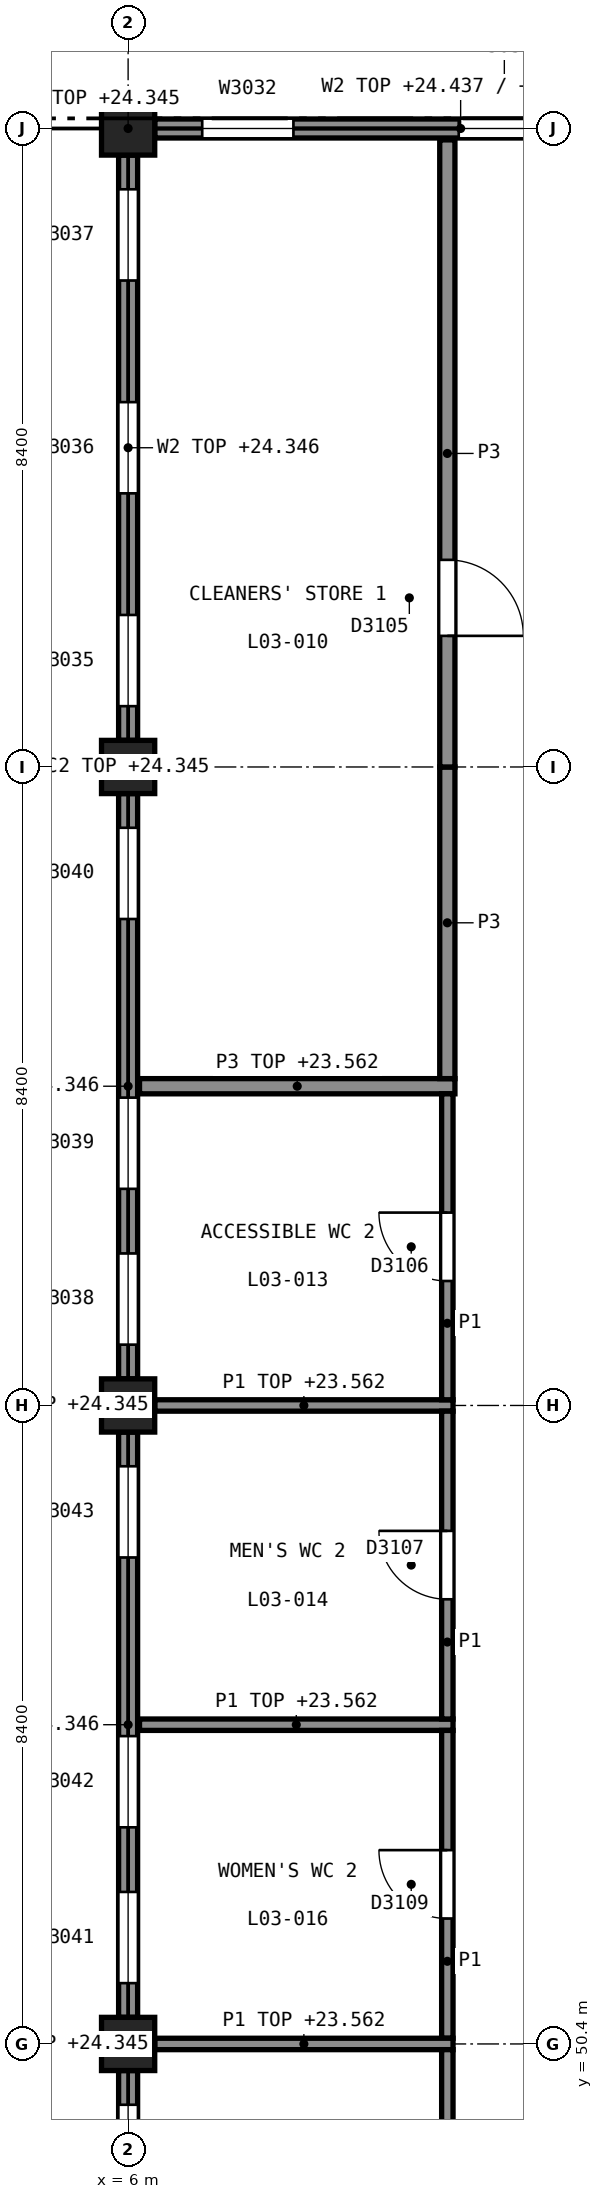
"""IFC4 building model, lengths in metres.
Left out: names, types, materials, properties, quantities, classifications, styles, units other than length and angle.
Written with IfcOpenShell. Run it as: python <this file> out.ifc"""

import sys

from ifc_helpers import new_model, si_unit, direction, frame, frame_2d, origin, origin_2d, place, context, subcontext, project, spatial, polyline, rectangle, outline, extrude, element, fill, save


model = new_model("IFC4")
c1 = context("Model", 3, precision=1e-05, world=origin(), true_north=direction((0.0, 1.0)))
c2 = subcontext(c1, "Body", "Model", "MODEL_VIEW")
j1 = project(units=[si_unit("LENGTHUNIT", "METRE"), si_unit("PLANEANGLEUNIT", "RADIAN")], contexts=[c1])
p1 = place(None, origin())
s1 = spatial("IfcSite", under=j1, at=p1, CompositionType="ELEMENT")
p2 = place(p1, origin())
s2 = spatial("IfcBuilding", under=s1, at=p2, CompositionType="ELEMENT")
p3 = place(p2, frame((0.0, 0.0, 20.0)))
s3 = spatial("IfcBuildingStorey", under=s2, at=p3, CompositionType="ELEMENT", Elevation=20.0)
for number, where, z_axis, x_axis in (
    (1, (6.0, 50.4, 0.0), (0.0, 0.0, 1.0), (1.0, 0.0, 0.0)),
    (2, (6.0, 58.8, 0.0), (0.0, 0.0, 1.0), (1.0, 0.0, 0.0)),
    (3, (6.0, 67.2, 0.0), (0.0, 0.0, 1.0), (1.0, 0.0, 0.0)),
    (4, (6.0, 75.6, 0.0), (0.0, 0.0, 1.0), (1.0, 0.0, 0.0)),
):
    element("IfcColumn", number, at=place(p3, frame(where, z_axis=z_axis, x_axis=x_axis)), inside=s3, PredefinedType="COLUMN", context=c2, shape_type="SweptSolid", body=[
        extrude(rectangle(XDim=0.7, YDim=0.7, at=origin_2d()), origin(), (0.0, 0.0, 1.0), 4.345),
    ])
p4 = place(p3, frame((6.35, 75.6, 0.0), z_axis=(0.0, 0.0, 1.0), x_axis=(1.0, 0.0, 0.0)))
e5 = element("IfcWall", 5, at=p4, inside=s3, PredefinedType="SOLIDWALL", context=c2, shape_type="SweptSolid", body=[
    extrude(outline(polyline([(0.0, 0.0), (8.05, 0.0), (8.05, 6.546), (0.0, 4.437), (0.0, 0.0)])), frame((0.0, 0.125, 0.0), z_axis=(0.0, -1.0, 0.0), x_axis=(1.0, 0.0, 0.0)), (0.0, 0.0, 1.0), 0.25),
])
p5 = place(p4, frame((0.625, 0.0, 0.9)))
e6 = element("IfcOpeningElement", 6, at=p5, cuts=e5, PredefinedType="OPENING", context=c2, shape_type="SweptSolid", body=[
    extrude(rectangle(XDim=1.2, YDim=2.1, at=frame_2d((0.6, 1.05))), frame((0.0, 0.135, 0.0), z_axis=(0.0, -1.0, 0.0), x_axis=(1.0, 0.0, 0.0)), (0.0, 0.0, 1.0), 0.27),
])
p6 = place(p4, frame((4.0, 0.0, 0.9)))
e7 = element("IfcOpeningElement", 7, at=p6, cuts=e5, PredefinedType="OPENING", context=c2, shape_type="SweptSolid", body=[
    extrude(rectangle(XDim=1.2, YDim=2.1, at=frame_2d((0.6, 1.05))), frame((0.0, 0.135, 0.0), z_axis=(0.0, -1.0, 0.0), x_axis=(1.0, 0.0, 0.0)), (0.0, 0.0, 1.0), 0.27),
])
p7 = place(p4, frame((6.225, 0.0, 0.9)))
e8 = element("IfcOpeningElement", 8, at=p7, cuts=e5, PredefinedType="OPENING", context=c2, shape_type="SweptSolid", body=[
    extrude(rectangle(XDim=1.2, YDim=2.1, at=frame_2d((0.6, 1.05))), frame((0.0, 0.135, 0.0), z_axis=(0.0, -1.0, 0.0), x_axis=(1.0, 0.0, 0.0)), (0.0, 0.0, 1.0), 0.27),
])
p8 = place(p3, frame((6.0, 67.55, 0.0), z_axis=(0.0, 0.0, 1.0), x_axis=(0.0, 1.0, 0.0)))
e9 = element("IfcWall", 9, at=p8, inside=s3, PredefinedType="SOLIDWALL", context=c2, shape_type="SweptSolid", body=[
    extrude(rectangle(XDim=7.7, YDim=0.25, at=frame_2d((3.85, 0.0))), origin(), (0.0, 0.0, 1.0), 4.346),
])
p9 = place(p8, frame((0.45, 0.0, 0.9)))
e10 = element("IfcOpeningElement", 10, at=p9, cuts=e9, PredefinedType="OPENING", context=c2, shape_type="SweptSolid", body=[
    extrude(rectangle(XDim=1.2, YDim=2.1, at=frame_2d((0.6, 1.05))), frame((0.0, 0.135, 0.0), z_axis=(0.0, -1.0, 0.0), x_axis=(1.0, 0.0, 0.0)), (0.0, 0.0, 1.0), 0.27),
])
p10 = place(p8, frame((3.25, 0.0, 0.9)))
e11 = element("IfcOpeningElement", 11, at=p10, cuts=e9, PredefinedType="OPENING", context=c2, shape_type="SweptSolid", body=[
    extrude(rectangle(XDim=1.2, YDim=2.1, at=frame_2d((0.6, 1.05))), frame((0.0, 0.135, 0.0), z_axis=(0.0, -1.0, 0.0), x_axis=(1.0, 0.0, 0.0)), (0.0, 0.0, 1.0), 0.27),
])
p11 = place(p8, frame((6.05, 0.0, 0.9)))
e12 = element("IfcOpeningElement", 12, at=p11, cuts=e9, PredefinedType="OPENING", context=c2, shape_type="SweptSolid", body=[
    extrude(rectangle(XDim=1.2, YDim=2.1, at=frame_2d((0.6, 1.05))), frame((0.0, 0.135, 0.0), z_axis=(0.0, -1.0, 0.0), x_axis=(1.0, 0.0, 0.0)), (0.0, 0.0, 1.0), 0.27),
])
p12 = place(p3, frame((6.0, 59.15, 0.0), z_axis=(0.0, 0.0, 1.0), x_axis=(0.0, 1.0, 0.0)))
e13 = element("IfcWall", 13, at=p12, inside=s3, PredefinedType="SOLIDWALL", context=c2, shape_type="SweptSolid", body=[
    extrude(rectangle(XDim=7.7, YDim=0.25, at=frame_2d((3.85, 0.0))), origin(), (0.0, 0.0, 1.0), 4.346),
])
p13 = place(p12, frame((0.45, 0.0, 0.9)))
e14 = element("IfcOpeningElement", 14, at=p13, cuts=e13, PredefinedType="OPENING", context=c2, shape_type="SweptSolid", body=[
    extrude(rectangle(XDim=1.2, YDim=2.1, at=frame_2d((0.6, 1.05))), frame((0.0, 0.135, 0.0), z_axis=(0.0, -1.0, 0.0), x_axis=(1.0, 0.0, 0.0)), (0.0, 0.0, 1.0), 0.27),
])
p14 = place(p12, frame((2.5, 0.0, 0.9)))
e15 = element("IfcOpeningElement", 15, at=p14, cuts=e13, PredefinedType="OPENING", context=c2, shape_type="SweptSolid", body=[
    extrude(rectangle(XDim=1.2, YDim=2.1, at=frame_2d((0.6, 1.05))), frame((0.0, 0.135, 0.0), z_axis=(0.0, -1.0, 0.0), x_axis=(1.0, 0.0, 0.0)), (0.0, 0.0, 1.0), 0.27),
])
p15 = place(p12, frame((6.05, 0.0, 0.9)))
e16 = element("IfcOpeningElement", 16, at=p15, cuts=e13, PredefinedType="OPENING", context=c2, shape_type="SweptSolid", body=[
    extrude(rectangle(XDim=1.2, YDim=2.1, at=frame_2d((0.6, 1.05))), frame((0.0, 0.135, 0.0), z_axis=(0.0, -1.0, 0.0), x_axis=(1.0, 0.0, 0.0)), (0.0, 0.0, 1.0), 0.27),
])
p16 = place(p3, frame((6.0, 50.75, 0.0), z_axis=(0.0, 0.0, 1.0), x_axis=(0.0, 1.0, 0.0)))
e17 = element("IfcWall", 17, at=p16, inside=s3, PredefinedType="SOLIDWALL", context=c2, shape_type="SweptSolid", body=[
    extrude(rectangle(XDim=7.7, YDim=0.25, at=frame_2d((3.85, 0.0))), origin(), (0.0, 0.0, 1.0), 4.346),
])
p17 = place(p16, frame((0.45, 0.0, 0.9)))
e18 = element("IfcOpeningElement", 18, at=p17, cuts=e17, PredefinedType="OPENING", context=c2, shape_type="SweptSolid", body=[
    extrude(rectangle(XDim=1.2, YDim=2.1, at=frame_2d((0.6, 1.05))), frame((0.0, 0.135, 0.0), z_axis=(0.0, -1.0, 0.0), x_axis=(1.0, 0.0, 0.0)), (0.0, 0.0, 1.0), 0.27),
])
p18 = place(p16, frame((2.5, 0.0, 0.9)))
e19 = element("IfcOpeningElement", 19, at=p18, cuts=e17, PredefinedType="OPENING", context=c2, shape_type="SweptSolid", body=[
    extrude(rectangle(XDim=1.2, YDim=2.1, at=frame_2d((0.6, 1.05))), frame((0.0, 0.135, 0.0), z_axis=(0.0, -1.0, 0.0), x_axis=(1.0, 0.0, 0.0)), (0.0, 0.0, 1.0), 0.27),
])
p19 = place(p16, frame((6.05, 0.0, 0.9)))
e20 = element("IfcOpeningElement", 20, at=p19, cuts=e17, PredefinedType="OPENING", context=c2, shape_type="SweptSolid", body=[
    extrude(rectangle(XDim=1.2, YDim=2.1, at=frame_2d((0.6, 1.05))), frame((0.0, 0.135, 0.0), z_axis=(0.0, -1.0, 0.0), x_axis=(1.0, 0.0, 0.0)), (0.0, 0.0, 1.0), 0.27),
])
p20 = place(p3, frame((6.0, 42.35, 0.0), z_axis=(0.0, 0.0, 1.0), x_axis=(0.0, 1.0, 0.0)))
e21 = element("IfcWall", 21, at=p20, inside=s3, PredefinedType="SOLIDWALL", context=c2, shape_type="SweptSolid", body=[
    extrude(rectangle(XDim=7.7, YDim=0.25, at=frame_2d((3.85, 0.0))), origin(), (0.0, 0.0, 1.0), 4.346),
])
p21 = place(p20, frame((0.45, 0.0, 0.9)))
e22 = element("IfcOpeningElement", 22, at=p21, cuts=e21, PredefinedType="OPENING", context=c2, shape_type="SweptSolid", body=[
    extrude(rectangle(XDim=1.2, YDim=2.1, at=frame_2d((0.6, 1.05))), frame((0.0, 0.135, 0.0), z_axis=(0.0, -1.0, 0.0), x_axis=(1.0, 0.0, 0.0)), (0.0, 0.0, 1.0), 0.27),
])
p22 = place(p20, frame((3.25, 0.0, 0.9)))
e23 = element("IfcOpeningElement", 23, at=p22, cuts=e21, PredefinedType="OPENING", context=c2, shape_type="SweptSolid", body=[
    extrude(rectangle(XDim=1.2, YDim=2.1, at=frame_2d((0.6, 1.05))), frame((0.0, 0.135, 0.0), z_axis=(0.0, -1.0, 0.0), x_axis=(1.0, 0.0, 0.0)), (0.0, 0.0, 1.0), 0.27),
])
p23 = place(p20, frame((6.05, 0.0, 0.9)))
e24 = element("IfcOpeningElement", 24, at=p23, cuts=e21, PredefinedType="OPENING", context=c2, shape_type="SweptSolid", body=[
    extrude(rectangle(XDim=1.2, YDim=2.1, at=frame_2d((0.6, 1.05))), frame((0.0, 0.135, 0.0), z_axis=(0.0, -1.0, 0.0), x_axis=(1.0, 0.0, 0.0)), (0.0, 0.0, 1.0), 0.27),
])
p24 = place(p3, frame((6.15, 63.0, 0.0), z_axis=(0.0, 0.0, 1.0), x_axis=(1.0, 0.0, 0.0)))
e25 = element("IfcWall", 25, at=p24, inside=s3, PredefinedType="PARTITIONING", context=c2, shape_type="SweptSolid", body=[
    extrude(rectangle(XDim=4.15, YDim=0.2, at=frame_2d((2.075, 0.0))), origin(), (0.0, 0.0, 1.0), 3.562),
])
p25 = place(p3, frame((10.2, 63.1, 0.0), z_axis=(0.0, 0.0, 1.0), x_axis=(0.0, 1.0, 0.0)))
e26 = element("IfcWall", 26, at=p25, inside=s3, PredefinedType="PARTITIONING", context=c2, shape_type="SweptSolid", body=[
    extrude(rectangle(XDim=4.1, YDim=0.2, at=frame_2d((2.05, 0.0))), origin(), (0.0, 0.0, 1.0), 5.0),
])
p26 = place(p3, frame((10.2, 67.2, 0.0), z_axis=(0.0, 0.0, 1.0), x_axis=(0.0, 1.0, 0.0)))
e27 = element("IfcWall", 27, at=p26, inside=s3, PredefinedType="PARTITIONING", context=c2, shape_type="SweptSolid", body=[
    extrude(outline(polyline([(0.0, 0.0), (8.25, 0.0), (8.25, 5.0), (5.25, 5.0), (4.2, 3.562), (3.15, 5.0), (0.0, 5.0), (0.0, 0.0)])), frame((0.0, 0.1, 0.0), z_axis=(0.0, -1.0, 0.0), x_axis=(1.0, 0.0, 0.0)), (0.0, 0.0, 1.0), 0.2),
])
p27 = place(p26, frame((1.725, 0.0, 0.0)))
e28 = element("IfcOpeningElement", 28, at=p27, cuts=e27, PredefinedType="OPENING", context=c2, shape_type="SweptSolid", body=[
    extrude(rectangle(XDim=1.0, YDim=2.1, at=frame_2d((0.5, 1.05))), frame((0.0, 0.11, 0.0), z_axis=(0.0, -1.0, 0.0), x_axis=(1.0, 0.0, 0.0)), (0.0, 0.0, 1.0), 0.22),
])
p28 = place(p3, frame((6.35, 58.8, 0.0), z_axis=(0.0, 0.0, 1.0), x_axis=(1.0, 0.0, 0.0)))
e29 = element("IfcWall", 29, at=p28, inside=s3, PredefinedType="PARTITIONING", context=c2, shape_type="SweptSolid", body=[
    extrude(rectangle(XDim=3.925, YDim=0.15, at=frame_2d((1.962, 0.0))), origin(), (0.0, 0.0, 1.0), 3.562),
])
p29 = place(p3, frame((10.2, 58.875, 0.0), z_axis=(0.0, 0.0, 1.0), x_axis=(0.0, 1.0, 0.0)))
e30 = element("IfcWall", 30, at=p29, inside=s3, PredefinedType="PARTITIONING", context=c2, shape_type="SweptSolid", body=[
    extrude(rectangle(XDim=4.025, YDim=0.15, at=frame_2d((2.012, 0.0))), origin(), (0.0, 0.0, 1.0), 5.0),
])
p30 = place(p29, frame((1.562, 0.0, 0.0)))
e31 = element("IfcOpeningElement", 31, at=p30, cuts=e30, PredefinedType="OPENING", context=c2, shape_type="SweptSolid", body=[
    extrude(rectangle(XDim=0.9, YDim=2.1, at=frame_2d((0.45, 1.05))), frame((0.0, 0.085, 0.0), z_axis=(0.0, -1.0, 0.0), x_axis=(1.0, 0.0, 0.0)), (0.0, 0.0, 1.0), 0.17),
])
p31 = place(p3, frame((6.15, 54.6, 0.0), z_axis=(0.0, 0.0, 1.0), x_axis=(1.0, 0.0, 0.0)))
e32 = element("IfcWall", 32, at=p31, inside=s3, PredefinedType="PARTITIONING", context=c2, shape_type="SweptSolid", body=[
    extrude(rectangle(XDim=4.125, YDim=0.15, at=frame_2d((2.062, 0.0))), origin(), (0.0, 0.0, 1.0), 3.562),
])
p32 = place(p3, frame((10.2, 54.675, 0.0), z_axis=(0.0, 0.0, 1.0), x_axis=(0.0, 1.0, 0.0)))
e33 = element("IfcWall", 33, at=p32, inside=s3, PredefinedType="PARTITIONING", context=c2, shape_type="SweptSolid", body=[
    extrude(rectangle(XDim=4.05, YDim=0.15, at=frame_2d((2.025, 0.0))), origin(), (0.0, 0.0, 1.0), 5.0),
])
p33 = place(p32, frame((1.575, 0.0, 0.0)))
e34 = element("IfcOpeningElement", 34, at=p33, cuts=e33, PredefinedType="OPENING", context=c2, shape_type="SweptSolid", body=[
    extrude(rectangle(XDim=0.9, YDim=2.1, at=frame_2d((0.45, 1.05))), frame((0.0, 0.085, 0.0), z_axis=(0.0, -1.0, 0.0), x_axis=(1.0, 0.0, 0.0)), (0.0, 0.0, 1.0), 0.17),
])
p34 = place(p3, frame((10.2, 50.475, 0.0), z_axis=(0.0, 0.0, 1.0), x_axis=(0.0, 1.0, 0.0)))
e35 = element("IfcWall", 35, at=p34, inside=s3, PredefinedType="PARTITIONING", context=c2, shape_type="SweptSolid", body=[
    extrude(rectangle(XDim=4.05, YDim=0.15, at=frame_2d((2.025, 0.0))), origin(), (0.0, 0.0, 1.0), 5.0),
])
p35 = place(p34, frame((1.575, 0.0, 0.0)))
e36 = element("IfcOpeningElement", 36, at=p35, cuts=e35, PredefinedType="OPENING", context=c2, shape_type="SweptSolid", body=[
    extrude(rectangle(XDim=0.9, YDim=2.1, at=frame_2d((0.45, 1.05))), frame((0.0, 0.085, 0.0), z_axis=(0.0, -1.0, 0.0), x_axis=(1.0, 0.0, 0.0)), (0.0, 0.0, 1.0), 0.17),
])
p36 = place(p3, frame((6.35, 50.4, 0.0), z_axis=(0.0, 0.0, 1.0), x_axis=(1.0, 0.0, 0.0)))
e37 = element("IfcWall", 37, at=p36, inside=s3, PredefinedType="PARTITIONING", context=c2, shape_type="SweptSolid", body=[
    extrude(rectangle(XDim=3.925, YDim=0.15, at=frame_2d((1.962, 0.0))), origin(), (0.0, 0.0, 1.0), 3.562),
])
p37 = place(p3, frame((10.2, 42.0, 0.0), z_axis=(0.0, 0.0, 1.0), x_axis=(0.0, 1.0, 0.0)))
e38 = element("IfcWall", 38, at=p37, inside=s3, PredefinedType="PARTITIONING", context=c2, shape_type="SweptSolid", body=[
    extrude(outline(polyline([(0.0, 0.0), (8.325, 0.0), (8.325, 5.0), (5.25, 5.0), (4.2, 3.562), (3.15, 5.0), (1.05, 5.0), (0.0, 3.562), (0.0, 0.0)])), frame((0.0, 0.075, 0.0), z_axis=(0.0, -1.0, 0.0), x_axis=(1.0, 0.0, 0.0)), (0.0, 0.0, 1.0), 0.15),
])
p38 = place(p5, origin())
e39 = element("IfcWindow", 39, at=p38, inside=s3, PartitioningType="SINGLE_PANEL", PredefinedType="WINDOW", context=c2, shape_type="SweptSolid", body=[
    extrude(rectangle(XDim=1.2, YDim=2.1, at=frame_2d((0.6, 1.05))), frame((0.0, -0.045, 0.0), z_axis=(0.0, -1.0, 0.0), x_axis=(1.0, 0.0, 0.0)), (0.0, 0.0, 1.0), 0.06),
])
fill(e6, e39)
p39 = place(p6, origin())
e40 = element("IfcWindow", 40, at=p39, inside=s3, PartitioningType="SINGLE_PANEL", PredefinedType="WINDOW", context=c2, shape_type="SweptSolid", body=[
    extrude(rectangle(XDim=1.2, YDim=2.1, at=frame_2d((0.6, 1.05))), frame((0.0, -0.045, 0.0), z_axis=(0.0, -1.0, 0.0), x_axis=(1.0, 0.0, 0.0)), (0.0, 0.0, 1.0), 0.06),
])
fill(e7, e40)
p40 = place(p9, origin())
e41 = element("IfcWindow", 41, at=p40, inside=s3, PartitioningType="SINGLE_PANEL", PredefinedType="WINDOW", context=c2, shape_type="SweptSolid", body=[
    extrude(rectangle(XDim=1.2, YDim=2.1, at=frame_2d((0.6, 1.05))), frame((0.0, -0.045, 0.0), z_axis=(0.0, -1.0, 0.0), x_axis=(1.0, 0.0, 0.0)), (0.0, 0.0, 1.0), 0.06),
])
fill(e10, e41)
p41 = place(p10, origin())
e42 = element("IfcWindow", 42, at=p41, inside=s3, PartitioningType="SINGLE_PANEL", PredefinedType="WINDOW", context=c2, shape_type="SweptSolid", body=[
    extrude(rectangle(XDim=1.2, YDim=2.1, at=frame_2d((0.6, 1.05))), frame((0.0, -0.045, 0.0), z_axis=(0.0, -1.0, 0.0), x_axis=(1.0, 0.0, 0.0)), (0.0, 0.0, 1.0), 0.06),
])
fill(e11, e42)
p42 = place(p11, origin())
e43 = element("IfcWindow", 43, at=p42, inside=s3, PartitioningType="SINGLE_PANEL", PredefinedType="WINDOW", context=c2, shape_type="SweptSolid", body=[
    extrude(rectangle(XDim=1.2, YDim=2.1, at=frame_2d((0.6, 1.05))), frame((0.0, -0.045, 0.0), z_axis=(0.0, -1.0, 0.0), x_axis=(1.0, 0.0, 0.0)), (0.0, 0.0, 1.0), 0.06),
])
fill(e12, e43)
p43 = place(p13, origin())
e44 = element("IfcWindow", 44, at=p43, inside=s3, PartitioningType="SINGLE_PANEL", PredefinedType="WINDOW", context=c2, shape_type="SweptSolid", body=[
    extrude(rectangle(XDim=1.2, YDim=2.1, at=frame_2d((0.6, 1.05))), frame((0.0, -0.045, 0.0), z_axis=(0.0, -1.0, 0.0), x_axis=(1.0, 0.0, 0.0)), (0.0, 0.0, 1.0), 0.06),
])
fill(e14, e44)
p44 = place(p14, origin())
e45 = element("IfcWindow", 45, at=p44, inside=s3, PartitioningType="SINGLE_PANEL", PredefinedType="WINDOW", context=c2, shape_type="SweptSolid", body=[
    extrude(rectangle(XDim=1.2, YDim=2.1, at=frame_2d((0.6, 1.05))), frame((0.0, -0.045, 0.0), z_axis=(0.0, -1.0, 0.0), x_axis=(1.0, 0.0, 0.0)), (0.0, 0.0, 1.0), 0.06),
])
fill(e15, e45)
p45 = place(p15, origin())
e46 = element("IfcWindow", 46, at=p45, inside=s3, PartitioningType="SINGLE_PANEL", PredefinedType="WINDOW", context=c2, shape_type="SweptSolid", body=[
    extrude(rectangle(XDim=1.2, YDim=2.1, at=frame_2d((0.6, 1.05))), frame((0.0, -0.045, 0.0), z_axis=(0.0, -1.0, 0.0), x_axis=(1.0, 0.0, 0.0)), (0.0, 0.0, 1.0), 0.06),
])
fill(e16, e46)
p46 = place(p17, origin())
e47 = element("IfcWindow", 47, at=p46, inside=s3, PartitioningType="SINGLE_PANEL", PredefinedType="WINDOW", context=c2, shape_type="SweptSolid", body=[
    extrude(rectangle(XDim=1.2, YDim=2.1, at=frame_2d((0.6, 1.05))), frame((0.0, -0.045, 0.0), z_axis=(0.0, -1.0, 0.0), x_axis=(1.0, 0.0, 0.0)), (0.0, 0.0, 1.0), 0.06),
])
fill(e18, e47)
p47 = place(p18, origin())
e48 = element("IfcWindow", 48, at=p47, inside=s3, PartitioningType="SINGLE_PANEL", PredefinedType="WINDOW", context=c2, shape_type="SweptSolid", body=[
    extrude(rectangle(XDim=1.2, YDim=2.1, at=frame_2d((0.6, 1.05))), frame((0.0, -0.045, 0.0), z_axis=(0.0, -1.0, 0.0), x_axis=(1.0, 0.0, 0.0)), (0.0, 0.0, 1.0), 0.06),
])
fill(e19, e48)
p48 = place(p19, origin())
e49 = element("IfcWindow", 49, at=p48, inside=s3, PartitioningType="SINGLE_PANEL", PredefinedType="WINDOW", context=c2, shape_type="SweptSolid", body=[
    extrude(rectangle(XDim=1.2, YDim=2.1, at=frame_2d((0.6, 1.05))), frame((0.0, -0.045, 0.0), z_axis=(0.0, -1.0, 0.0), x_axis=(1.0, 0.0, 0.0)), (0.0, 0.0, 1.0), 0.06),
])
fill(e20, e49)
p49 = place(p23, origin())
e50 = element("IfcWindow", 50, at=p49, inside=s3, PartitioningType="SINGLE_PANEL", PredefinedType="WINDOW", context=c2, shape_type="SweptSolid", body=[
    extrude(rectangle(XDim=1.2, YDim=2.1, at=frame_2d((0.6, 1.05))), frame((0.0, -0.045, 0.0), z_axis=(0.0, -1.0, 0.0), x_axis=(1.0, 0.0, 0.0)), (0.0, 0.0, 1.0), 0.06),
])
fill(e24, e50)
p50 = place(p27, origin())
e51 = element("IfcDoor", 51, at=p50, inside=s3, OperationType="SINGLE_SWING_LEFT", PredefinedType="DOOR", context=c2, shape_type="SweptSolid", body=[
    extrude(rectangle(XDim=1.0, YDim=2.1, at=frame_2d((0.5, 1.05))), frame((0.0, 0.025, 0.0), z_axis=(0.0, -1.0, 0.0), x_axis=(1.0, 0.0, 0.0)), (0.0, 0.0, 1.0), 0.05),
])
fill(e28, e51)
p51 = place(p30, origin())
e52 = element("IfcDoor", 52, at=p51, inside=s3, OperationType="SINGLE_SWING_LEFT", PredefinedType="DOOR", context=c2, shape_type="SweptSolid", body=[
    extrude(rectangle(XDim=0.9, YDim=2.1, at=frame_2d((0.45, 1.05))), frame((0.0, 0.025, 0.0), z_axis=(0.0, -1.0, 0.0), x_axis=(1.0, 0.0, 0.0)), (0.0, 0.0, 1.0), 0.05),
])
fill(e31, e52)
p52 = place(p33, origin())
e53 = element("IfcDoor", 53, at=p52, inside=s3, OperationType="SINGLE_SWING_LEFT", PredefinedType="DOOR", context=c2, shape_type="SweptSolid", body=[
    extrude(rectangle(XDim=0.9, YDim=2.1, at=frame_2d((0.45, 1.05))), frame((0.0, 0.025, 0.0), z_axis=(0.0, -1.0, 0.0), x_axis=(1.0, 0.0, 0.0)), (0.0, 0.0, 1.0), 0.05),
])
fill(e34, e53)
p53 = place(p35, origin())
e54 = element("IfcDoor", 54, at=p53, inside=s3, OperationType="SINGLE_SWING_LEFT", PredefinedType="DOOR", context=c2, shape_type="SweptSolid", body=[
    extrude(rectangle(XDim=0.9, YDim=2.1, at=frame_2d((0.45, 1.05))), frame((0.0, 0.025, 0.0), z_axis=(0.0, -1.0, 0.0), x_axis=(1.0, 0.0, 0.0)), (0.0, 0.0, 1.0), 0.05),
])
fill(e36, e54)
save(model, sys.argv[1])
